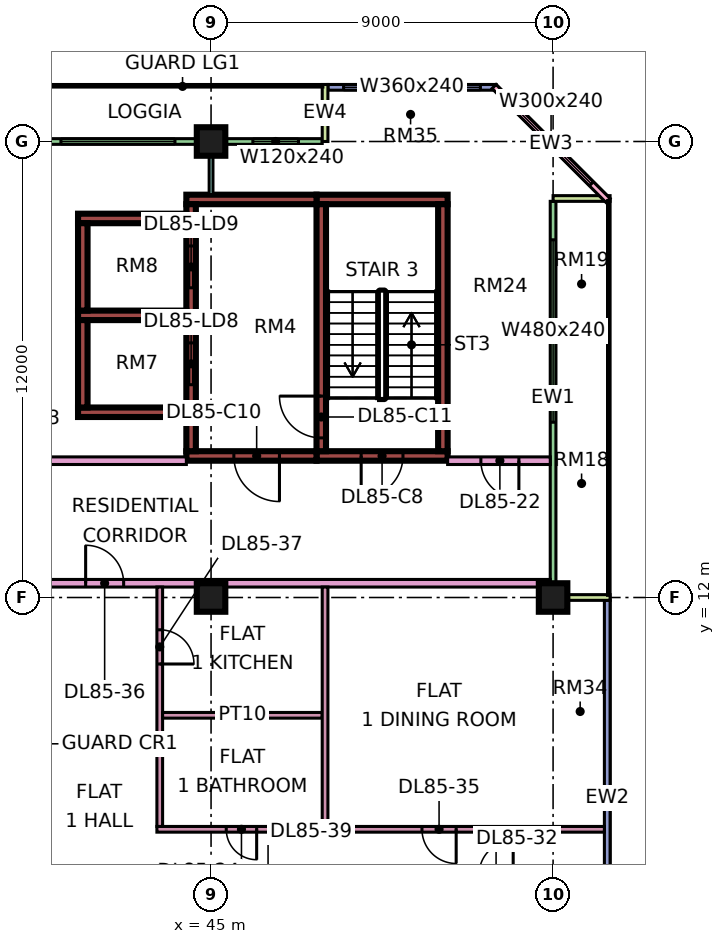
"""IFC4 building model, lengths in metres.
Left out: names, types, materials, properties, quantities, classifications, styles, units other than length and angle.
Written with IfcOpenShell. Run it as: python <this file> out.ifc"""

import sys

from ifc_helpers import new_model, si_unit, direction, frame, frame_2d, origin, origin_2d, place, context, subcontext, project, spatial, rectangle, extrude, element, fill, save


model = new_model("IFC4")
c1 = context("Model", 3, precision=1e-05, world=origin(), true_north=direction((0.0, 1.0)))
c2 = subcontext(c1, "Body", "Model", "MODEL_VIEW")
j1 = project(units=[si_unit("LENGTHUNIT", "METRE"), si_unit("PLANEANGLEUNIT", "RADIAN")], contexts=[c1])
p1 = place(None, origin())
s1 = spatial("IfcSite", under=j1, at=p1, CompositionType="ELEMENT")
p2 = place(p1, origin())
s2 = spatial("IfcBuilding", under=s1, at=p2, CompositionType="ELEMENT")
p3 = place(p2, frame((0.0, 0.0, 365.15)))
s3 = spatial("IfcBuildingStorey", under=s2, at=p3, CompositionType="ELEMENT", Elevation=365.15)
for number, where, z_axis, x_axis in (
    (1, (45.0, 12.0, 0.0), (0.0, 0.0, 1.0), (1.0, 0.0, 0.0)),
    (2, (45.0, 24.0, 0.0), (0.0, 0.0, 1.0), (1.0, 0.0, 0.0)),
    (3, (54.0, 12.0, 0.0), (0.0, 0.0, 1.0), (1.0, 0.0, 0.0)),
):
    element("IfcColumn", number, at=place(p3, frame(where, z_axis=z_axis, x_axis=x_axis)), inside=s3, PredefinedType="COLUMN", context=c2, shape_type="SweptSolid", body=[
        extrude(rectangle(XDim=0.75, YDim=0.75, at=origin_2d()), origin(), (0.0, 0.0, 1.0), 3.75),
    ])
p4 = place(p3, frame((47.775, 15.725, 0.0), z_axis=(0.0, 0.0, 1.0), x_axis=(1.0, 0.0, 0.0)))
e4 = element("IfcWall", 4, at=p4, inside=s3, PredefinedType="SHEAR", context=c2, shape_type="SweptSolid", body=[
    extrude(rectangle(XDim=3.45, YDim=0.25, at=frame_2d((1.725, 0.0))), origin(), (0.0, 0.0, 1.0), 3.75),
])
p5 = place(p4, frame((1.175, 0.0, 0.0)))
e5 = element("IfcOpeningElement", 5, at=p5, cuts=e4, PredefinedType="OPENING", context=c2, shape_type="SweptSolid", body=[
    extrude(rectangle(XDim=1.1, YDim=2.2, at=frame_2d((0.55, 1.1))), frame((0.0, 0.135, 0.0), z_axis=(0.0, -1.0, 0.0), x_axis=(1.0, 0.0, 0.0)), (0.0, 0.0, 1.0), 0.27),
])
p6 = place(p3, frame((47.775, 22.475, 0.0), z_axis=(0.0, 0.0, 1.0), x_axis=(1.0, 0.0, 0.0)))
e6 = element("IfcWall", 6, at=p6, inside=s3, PredefinedType="SHEAR", context=c2, shape_type="SweptSolid", body=[
    extrude(rectangle(XDim=3.45, YDim=0.25, at=frame_2d((1.725, 0.0))), origin(), (0.0, 0.0, 1.0), 3.75),
])
p7 = place(p3, frame((47.9, 15.85, 0.0), z_axis=(0.0, 0.0, 1.0), x_axis=(0.0, 1.0, 0.0)))
e7 = element("IfcWall", 7, at=p7, inside=s3, PredefinedType="SHEAR", context=c2, shape_type="SweptSolid", body=[
    extrude(rectangle(XDim=6.5, YDim=0.25, at=frame_2d((3.25, 0.0))), origin(), (0.0, 0.0, 1.0), 3.75),
])
p8 = place(p7, frame((0.35, 0.0, 0.0)))
e8 = element("IfcOpeningElement", 8, at=p8, cuts=e7, PredefinedType="OPENING", context=c2, shape_type="SweptSolid", body=[
    extrude(rectangle(XDim=1.1, YDim=2.2, at=frame_2d((0.55, 1.1))), frame((0.0, 0.135, 0.0), z_axis=(0.0, -1.0, 0.0), x_axis=(1.0, 0.0, 0.0)), (0.0, 0.0, 1.0), 0.27),
])
p9 = place(p3, frame((51.1, 15.85, 0.0), z_axis=(0.0, 0.0, 1.0), x_axis=(0.0, 1.0, 0.0)))
e9 = element("IfcWall", 9, at=p9, inside=s3, PredefinedType="SHEAR", context=c2, shape_type="SweptSolid", body=[
    extrude(rectangle(XDim=6.5, YDim=0.25, at=frame_2d((3.25, 0.0))), origin(), (0.0, 0.0, 1.0), 3.75),
])
p10 = place(p3, frame((44.35, 15.725, 0.0), z_axis=(0.0, 0.0, 1.0), x_axis=(1.0, 0.0, 0.0)))
e10 = element("IfcWall", 10, at=p10, inside=s3, PredefinedType="SHEAR", context=c2, shape_type="SweptSolid", body=[
    extrude(rectangle(XDim=3.425, YDim=0.25, at=frame_2d((1.712, 0.0))), origin(), (0.0, 0.0, 1.0), 3.75),
])
p11 = place(p10, frame((1.25, 0.0, 0.0)))
e11 = element("IfcOpeningElement", 11, at=p11, cuts=e10, PredefinedType="OPENING", context=c2, shape_type="SweptSolid", body=[
    extrude(rectangle(XDim=1.2, YDim=2.2, at=frame_2d((0.6, 1.1))), frame((0.0, 0.135, 0.0), z_axis=(0.0, -1.0, 0.0), x_axis=(1.0, 0.0, 0.0)), (0.0, 0.0, 1.0), 0.27),
])
p12 = place(p3, frame((44.35, 22.475, 0.0), z_axis=(0.0, 0.0, 1.0), x_axis=(1.0, 0.0, 0.0)))
e12 = element("IfcWall", 12, at=p12, inside=s3, PredefinedType="SHEAR", context=c2, shape_type="SweptSolid", body=[
    extrude(rectangle(XDim=3.425, YDim=0.25, at=frame_2d((1.712, 0.0))), origin(), (0.0, 0.0, 1.0), 3.75),
])
p13 = place(p3, frame((44.475, 15.85, 0.0), z_axis=(0.0, 0.0, 1.0), x_axis=(0.0, 1.0, 0.0)))
e13 = element("IfcWall", 13, at=p13, inside=s3, PredefinedType="SHEAR", context=c2, shape_type="SweptSolid", body=[
    extrude(rectangle(XDim=6.5, YDim=0.25, at=frame_2d((3.25, 0.0))), origin(), (0.0, 0.0, 1.0), 3.75),
])
p14 = place(p13, frame((1.75, 0.0, 0.0)))
e14 = element("IfcOpeningElement", 14, at=p14, cuts=e13, PredefinedType="OPENING", context=c2, shape_type="SweptSolid", body=[
    extrude(rectangle(XDim=1.1, YDim=2.2, at=frame_2d((0.55, 1.1))), frame((0.0, 0.135, 0.0), z_axis=(0.0, -1.0, 0.0), x_axis=(1.0, 0.0, 0.0)), (0.0, 0.0, 1.0), 0.27),
])
p15 = place(p13, frame((4.3, 0.0, 0.0)))
e15 = element("IfcOpeningElement", 15, at=p15, cuts=e13, PredefinedType="OPENING", context=c2, shape_type="SweptSolid", body=[
    extrude(rectangle(XDim=1.1, YDim=2.2, at=frame_2d((0.55, 1.1))), frame((0.0, 0.135, 0.0), z_axis=(0.0, -1.0, 0.0), x_axis=(1.0, 0.0, 0.0)), (0.0, 0.0, 1.0), 0.27),
])
for number, where, z_axis, x_axis in (
    (16, (41.5, 16.875, 0.0), (0.0, 0.0, 1.0), (1.0, 0.0, 0.0)),
    (17, (41.5, 19.425, 0.0), (0.0, 0.0, 1.0), (1.0, 0.0, 0.0)),
    (18, (41.5, 21.975, 0.0), (0.0, 0.0, 1.0), (1.0, 0.0, 0.0)),
):
    element("IfcWall", number, at=place(p3, frame(where, z_axis=z_axis, x_axis=x_axis)), inside=s3, PredefinedType="SHEAR", context=c2, shape_type="SweptSolid", body=[
        extrude(rectangle(XDim=2.85, YDim=0.25, at=frame_2d((1.425, 0.0))), origin(), (0.0, 0.0, 1.0), 3.75),
    ])
for number, where, z_axis, x_axis in (
    (19, (41.625, 17.0, 0.0), (0.0, 0.0, 1.0), (0.0, 1.0, 0.0)),
    (20, (41.625, 19.55, 0.0), (0.0, 0.0, 1.0), (0.0, 1.0, 0.0)),
):
    element("IfcWall", number, at=place(p3, frame(where, z_axis=z_axis, x_axis=x_axis)), inside=s3, PredefinedType="SHEAR", context=c2, shape_type="SweptSolid", body=[
        extrude(rectangle(XDim=2.3, YDim=0.25, at=frame_2d((1.15, 0.0))), origin(), (0.0, 0.0, 1.0), 3.75),
    ])
p16 = place(p3, frame((52.5, 25.425, 0.0), z_axis=(0.0, 0.0, 1.0), x_axis=(-1.0, 0.0, 0.0)))
e21 = element("IfcWall", 21, at=p16, inside=s3, PredefinedType="SOLIDWALL", context=c2, shape_type="SweptSolid", body=[
    extrude(rectangle(XDim=4.425, YDim=0.15, at=frame_2d((2.212, 0.0))), origin(), (0.0, 0.0, 1.0), 3.35),
])
p17 = place(p16, frame((0.413, 0.0, 0.45)))
e22 = element("IfcOpeningElement", 22, at=p17, cuts=e21, PredefinedType="OPENING", context=c2, shape_type="SweptSolid", body=[
    extrude(rectangle(XDim=3.6, YDim=2.4, at=frame_2d((1.8, 1.2))), frame((0.0, 0.085, 0.0), z_axis=(0.0, -1.0, 0.0), x_axis=(1.0, 0.0, 0.0)), (0.0, 0.0, 1.0), 0.17),
])
p18 = place(p3, frame((47.925, 24.0, 0.0), z_axis=(0.0, 0.0, 1.0), x_axis=(-1.0, 0.0, 0.0)))
e23 = element("IfcWall", 23, at=p18, inside=s3, PredefinedType="SOLIDWALL", context=c2, shape_type="SweptSolid", body=[
    extrude(rectangle(XDim=7.35, YDim=0.15, at=frame_2d((3.675, 0.0))), origin(), (0.0, 0.0, 1.0), 3.35),
])
p19 = place(p18, frame((0.625, 0.0, 0.45)))
e24 = element("IfcOpeningElement", 24, at=p19, cuts=e23, PredefinedType="OPENING", context=c2, shape_type="SweptSolid", body=[
    extrude(rectangle(XDim=1.2, YDim=2.4, at=frame_2d((0.6, 1.2))), frame((0.0, 0.085, 0.0), z_axis=(0.0, -1.0, 0.0), x_axis=(1.0, 0.0, 0.0)), (0.0, 0.0, 1.0), 0.17),
])
p20 = place(p18, frame((3.875, 0.0, 0.45)))
e25 = element("IfcOpeningElement", 25, at=p20, cuts=e23, PredefinedType="OPENING", context=c2, shape_type="SweptSolid", body=[
    extrude(rectangle(XDim=3.0, YDim=2.4, at=frame_2d((1.5, 1.2))), frame((0.0, 0.085, 0.0), z_axis=(0.0, -1.0, 0.0), x_axis=(1.0, 0.0, 0.0)), (0.0, 0.0, 1.0), 0.17),
])
p21 = place(p3, frame((48.0, 25.5, 0.0), z_axis=(0.0, 0.0, 1.0), x_axis=(0.0, -1.0, 0.0)))
e26 = element("IfcWall", 26, at=p21, inside=s3, PredefinedType="SOLIDWALL", context=c2, shape_type="SweptSolid", body=[
    extrude(rectangle(XDim=1.5, YDim=0.15, at=frame_2d((0.75, 0.0))), origin(), (0.0, 0.0, 1.0), 3.35),
])
p22 = place(p3, frame((55.425, 1.5, 0.0), z_axis=(0.0, 0.0, 1.0), x_axis=(0.0, 1.0, 0.0)))
e27 = element("IfcWall", 27, at=p22, inside=s3, PredefinedType="SOLIDWALL", context=c2, shape_type="SweptSolid", body=[
    extrude(rectangle(XDim=10.425, YDim=0.15, at=frame_2d((5.212, 0.0))), origin(), (0.0, 0.0, 1.0), 3.35),
])
p23 = place(p22, frame((0.4, 0.0, 0.45)))
e28 = element("IfcOpeningElement", 28, at=p23, cuts=e27, PredefinedType="OPENING", context=c2, shape_type="SweptSolid", body=[
    extrude(rectangle(XDim=2.4, YDim=2.4, at=frame_2d((1.2, 1.2))), frame((0.0, 0.085, 0.0), z_axis=(0.0, -1.0, 0.0), x_axis=(1.0, 0.0, 0.0)), (0.0, 0.0, 1.0), 0.17),
])
p24 = place(p3, frame((54.0, 12.075, 0.0), z_axis=(0.0, 0.0, 1.0), x_axis=(0.0, 1.0, 0.0)))
e29 = element("IfcWall", 29, at=p24, inside=s3, PredefinedType="SOLIDWALL", context=c2, shape_type="SweptSolid", body=[
    extrude(rectangle(XDim=10.35, YDim=0.15, at=frame_2d((5.175, 0.0))), origin(), (0.0, 0.0, 1.0), 3.35),
])
p25 = place(p24, frame((4.538, 0.0, 0.45)))
e30 = element("IfcOpeningElement", 30, at=p25, cuts=e29, PredefinedType="OPENING", context=c2, shape_type="SweptSolid", body=[
    extrude(rectangle(XDim=4.8, YDim=2.4, at=frame_2d((2.4, 1.2))), frame((0.0, 0.085, 0.0), z_axis=(0.0, -1.0, 0.0), x_axis=(1.0, 0.0, 0.0)), (0.0, 0.0, 1.0), 0.17),
])
for number, where, z_axis, x_axis in (
    (31, (55.5, 12.0, 0.0), (0.0, 0.0, 1.0), (-1.0, 0.0, 0.0)),
    (32, (55.5, 22.5, 0.0), (0.0, 0.0, 1.0), (-1.0, 0.0, 0.0)),
):
    element("IfcWall", number, at=place(p3, frame(where, z_axis=z_axis, x_axis=x_axis)), inside=s3, PredefinedType="SOLIDWALL", context=c2, shape_type="SweptSolid", body=[
        extrude(rectangle(XDim=1.5, YDim=0.15, at=frame_2d((0.75, 0.0))), origin(), (0.0, 0.0, 1.0), 3.35),
    ])
p26 = place(p3, frame((55.447, 22.447, 0.0), z_axis=(0.0, 0.0, 1.0), x_axis=(-0.707106781187, 0.707106781187, 0.0)))
e33 = element("IfcWall", 33, at=p26, inside=s3, PredefinedType="SOLIDWALL", context=c2, shape_type="SweptSolid", body=[
    extrude(rectangle(XDim=4.243, YDim=0.15, at=frame_2d((2.121, 0.0))), origin(), (0.0, 0.0, 1.0), 3.35),
])
p27 = place(p26, frame((0.621, 0.0, 0.45)))
e34 = element("IfcOpeningElement", 34, at=p27, cuts=e33, PredefinedType="OPENING", context=c2, shape_type="SweptSolid", body=[
    extrude(rectangle(XDim=3.0, YDim=2.4, at=frame_2d((1.5, 1.2))), frame((0.0, 0.085, 0.0), z_axis=(0.0, -1.0, 0.0), x_axis=(1.0, 0.0, 0.0)), (0.0, 0.0, 1.0), 0.17),
])
p28 = place(p3, frame((34.0, 15.6, 0.0), z_axis=(0.0, 0.0, 1.0), x_axis=(1.0, 0.0, 0.0)))
e35 = element("IfcWall", 35, at=p28, inside=s3, PredefinedType="PARTITIONING", context=c2, shape_type="SweptSolid", body=[
    extrude(rectangle(XDim=10.35, YDim=0.2, at=frame_2d((5.175, 0.0))), origin(), (0.0, 0.0, 1.0), 3.35),
])
p29 = place(p28, frame((5.6, 0.0, 0.0)))
e36 = element("IfcOpeningElement", 36, at=p29, cuts=e35, PredefinedType="OPENING", context=c2, shape_type="SweptSolid", body=[
    extrude(rectangle(XDim=1.0, YDim=2.1, at=frame_2d((0.5, 1.05))), frame((0.0, 0.11, 0.0), z_axis=(0.0, -1.0, 0.0), x_axis=(1.0, 0.0, 0.0)), (0.0, 0.0, 1.0), 0.22),
])
p30 = place(p28, frame((0.45, 0.0, 0.0)))
e37 = element("IfcOpeningElement", 37, at=p30, cuts=e35, PredefinedType="OPENING", context=c2, shape_type="SweptSolid", body=[
    extrude(rectangle(XDim=1.2, YDim=2.1, at=frame_2d((0.6, 1.05))), frame((0.0, 0.11, 0.0), z_axis=(0.0, -1.0, 0.0), x_axis=(1.0, 0.0, 0.0)), (0.0, 0.0, 1.0), 0.22),
])
p31 = place(p3, frame((40.65, 12.375, 0.0), z_axis=(0.0, 0.0, 1.0), x_axis=(1.0, 0.0, 0.0)))
e38 = element("IfcWall", 38, at=p31, inside=s3, PredefinedType="PARTITIONING", context=c2, shape_type="SweptSolid", body=[
    extrude(rectangle(XDim=13.276, YDim=0.2, at=frame_2d((6.638, 0.0))), origin(), (0.0, 0.0, 1.0), 3.35),
])
p32 = place(p31, frame((1.05, 0.0, 0.0)))
e39 = element("IfcOpeningElement", 39, at=p32, cuts=e38, PredefinedType="OPENING", context=c2, shape_type="SweptSolid", body=[
    extrude(rectangle(XDim=1.0, YDim=2.1, at=frame_2d((0.5, 1.05))), frame((0.0, 0.11, 0.0), z_axis=(0.0, -1.0, 0.0), x_axis=(1.0, 0.0, 0.0)), (0.0, 0.0, 1.0), 0.22),
])
p33 = place(p3, frame((43.575, 5.9, 0.0), z_axis=(0.0, 0.0, 1.0), x_axis=(1.0, 0.0, 0.0)))
e40 = element("IfcWall", 40, at=p33, inside=s3, PredefinedType="PARTITIONING", context=c2, shape_type="SweptSolid", body=[
    extrude(rectangle(XDim=11.775, YDim=0.15, at=frame_2d((5.888, 0.0))), origin(), (0.0, 0.0, 1.0), 3.35),
])
p34 = place(p33, frame((1.825, 0.0, 0.0)))
e41 = element("IfcOpeningElement", 41, at=p34, cuts=e40, PredefinedType="OPENING", context=c2, shape_type="SweptSolid", body=[
    extrude(rectangle(XDim=0.8, YDim=2.1, at=frame_2d((0.4, 1.05))), frame((0.0, 0.085, 0.0), z_axis=(0.0, -1.0, 0.0), x_axis=(1.0, 0.0, 0.0)), (0.0, 0.0, 1.0), 0.17),
])
p35 = place(p33, frame((6.975, 0.0, 0.0)))
e42 = element("IfcOpeningElement", 42, at=p35, cuts=e40, PredefinedType="OPENING", context=c2, shape_type="SweptSolid", body=[
    extrude(rectangle(XDim=0.9, YDim=2.1, at=frame_2d((0.45, 1.05))), frame((0.0, 0.085, 0.0), z_axis=(0.0, -1.0, 0.0), x_axis=(1.0, 0.0, 0.0)), (0.0, 0.0, 1.0), 0.17),
])
p36 = place(p3, frame((43.65, 5.975, 0.0), z_axis=(0.0, 0.0, 1.0), x_axis=(0.0, 1.0, 0.0)))
e43 = element("IfcWall", 43, at=p36, inside=s3, PredefinedType="PARTITIONING", context=c2, shape_type="SweptSolid", body=[
    extrude(rectangle(XDim=6.3, YDim=0.15, at=frame_2d((3.15, 0.0))), origin(), (0.0, 0.0, 1.0), 3.35),
])
p37 = place(p36, frame((4.275, 0.0, 0.0)))
e44 = element("IfcOpeningElement", 44, at=p37, cuts=e43, PredefinedType="OPENING", context=c2, shape_type="SweptSolid", body=[
    extrude(rectangle(XDim=0.9, YDim=2.1, at=frame_2d((0.45, 1.05))), frame((0.0, 0.085, 0.0), z_axis=(0.0, -1.0, 0.0), x_axis=(1.0, 0.0, 0.0)), (0.0, 0.0, 1.0), 0.17),
])
p38 = place(p3, frame((43.725, 8.9, 0.0), z_axis=(0.0, 0.0, 1.0), x_axis=(1.0, 0.0, 0.0)))
e45 = element("IfcWall", 45, at=p38, inside=s3, PredefinedType="PARTITIONING", context=c2, shape_type="SweptSolid", body=[
    extrude(rectangle(XDim=4.2, YDim=0.15, at=frame_2d((2.1, 0.0))), origin(), (0.0, 0.0, 1.0), 3.35),
])
p39 = place(p3, frame((45.0, 22.6, 0.0), z_axis=(0.0, 0.0, 1.0), x_axis=(0.0, 1.0, 0.0)))
e46 = element("IfcWall", 46, at=p39, inside=s3, PredefinedType="PARTITIONING", context=c2, shape_type="SweptSolid", body=[
    extrude(rectangle(XDim=1.326, YDim=0.1, at=frame_2d((0.663, 0.0))), origin(), (0.0, 0.0, 1.0), 3.35),
])
p40 = place(p3, frame((48.0, 5.975, 0.0), z_axis=(0.0, 0.0, 1.0), x_axis=(0.0, 1.0, 0.0)))
e47 = element("IfcWall", 47, at=p40, inside=s3, PredefinedType="PARTITIONING", context=c2, shape_type="SweptSolid", body=[
    extrude(rectangle(XDim=6.3, YDim=0.15, at=frame_2d((3.15, 0.0))), origin(), (0.0, 0.0, 1.0), 3.35),
])
p41 = place(p3, frame((51.225, 15.6, 0.0), z_axis=(0.0, 0.0, 1.0), x_axis=(1.0, 0.0, 0.0)))
e48 = element("IfcWall", 48, at=p41, inside=s3, PredefinedType="PARTITIONING", context=c2, shape_type="SweptSolid", body=[
    extrude(rectangle(XDim=2.701, YDim=0.2, at=frame_2d((1.351, 0.0))), origin(), (0.0, 0.0, 1.0), 3.35),
])
p42 = place(p41, frame((0.875, 0.0, 0.0)))
e49 = element("IfcOpeningElement", 49, at=p42, cuts=e48, PredefinedType="OPENING", context=c2, shape_type="SweptSolid", body=[
    extrude(rectangle(XDim=1.0, YDim=2.1, at=frame_2d((0.5, 1.05))), frame((0.0, 0.11, 0.0), z_axis=(0.0, -1.0, 0.0), x_axis=(1.0, 0.0, 0.0)), (0.0, 0.0, 1.0), 0.22),
])
p43 = place(p17, origin())
e50 = element("IfcWindow", 50, at=p43, inside=s3, PartitioningType="SINGLE_PANEL", PredefinedType="WINDOW", context=c2, shape_type="SweptSolid", body=[
    extrude(rectangle(XDim=3.6, YDim=2.4, at=frame_2d((1.8, 1.2))), frame((0.0, 0.03, 0.0), z_axis=(0.0, -1.0, 0.0), x_axis=(1.0, 0.0, 0.0)), (0.0, 0.0, 1.0), 0.06),
])
fill(e22, e50)
p44 = place(p19, origin())
e51 = element("IfcWindow", 51, at=p44, inside=s3, PartitioningType="SINGLE_PANEL", PredefinedType="WINDOW", context=c2, shape_type="SweptSolid", body=[
    extrude(rectangle(XDim=1.2, YDim=2.4, at=frame_2d((0.6, 1.2))), frame((0.0, 0.03, 0.0), z_axis=(0.0, -1.0, 0.0), x_axis=(1.0, 0.0, 0.0)), (0.0, 0.0, 1.0), 0.06),
])
fill(e24, e51)
p45 = place(p20, origin())
e52 = element("IfcWindow", 52, at=p45, inside=s3, PartitioningType="SINGLE_PANEL", PredefinedType="WINDOW", context=c2, shape_type="SweptSolid", body=[
    extrude(rectangle(XDim=3.0, YDim=2.4, at=frame_2d((1.5, 1.2))), frame((0.0, 0.03, 0.0), z_axis=(0.0, -1.0, 0.0), x_axis=(1.0, 0.0, 0.0)), (0.0, 0.0, 1.0), 0.06),
])
fill(e25, e52)
p46 = place(p25, origin())
e53 = element("IfcWindow", 53, at=p46, inside=s3, PartitioningType="SINGLE_PANEL", PredefinedType="WINDOW", context=c2, shape_type="SweptSolid", body=[
    extrude(rectangle(XDim=4.8, YDim=2.4, at=frame_2d((2.4, 1.2))), frame((0.0, 0.03, 0.0), z_axis=(0.0, -1.0, 0.0), x_axis=(1.0, 0.0, 0.0)), (0.0, 0.0, 1.0), 0.06),
])
fill(e30, e53)
p47 = place(p27, origin())
e54 = element("IfcWindow", 54, at=p47, inside=s3, PartitioningType="SINGLE_PANEL", PredefinedType="WINDOW", context=c2, shape_type="SweptSolid", body=[
    extrude(rectangle(XDim=3.0, YDim=2.4, at=frame_2d((1.5, 1.2))), frame((0.0, 0.03, 0.0), z_axis=(0.0, -1.0, 0.0), x_axis=(1.0, 0.0, 0.0)), (0.0, 0.0, 1.0), 0.06),
])
fill(e34, e54)
p48 = place(p5, frame((1.1, 0.0, 0.0), z_axis=(0.0, 0.0, 1.0), x_axis=(-1.0, 0.0, 0.0)))
e55 = element("IfcDoor", 55, at=p48, inside=s3, OperationType="SINGLE_SWING_LEFT", PredefinedType="DOOR", context=c2, shape_type="SweptSolid", body=[
    extrude(rectangle(XDim=1.1, YDim=2.2, at=frame_2d((0.55, 1.1))), frame((0.0, 0.025, 0.0), z_axis=(0.0, -1.0, 0.0), x_axis=(1.0, 0.0, 0.0)), (0.0, 0.0, 1.0), 0.05),
])
fill(e5, e55)
p49 = place(p11, origin())
e56 = element("IfcDoor", 56, at=p49, inside=s3, OperationType="SINGLE_SWING_RIGHT", PredefinedType="DOOR", context=c2, shape_type="SweptSolid", body=[
    extrude(rectangle(XDim=1.2, YDim=2.2, at=frame_2d((0.6, 1.1))), frame((0.0, 0.025, 0.0), z_axis=(0.0, -1.0, 0.0), x_axis=(1.0, 0.0, 0.0)), (0.0, 0.0, 1.0), 0.05),
])
fill(e11, e56)
p50 = place(p8, frame((1.1, 0.0, 0.0), z_axis=(0.0, 0.0, 1.0), x_axis=(-1.0, 0.0, 0.0)))
e57 = element("IfcDoor", 57, at=p50, inside=s3, OperationType="SINGLE_SWING_RIGHT", PredefinedType="DOOR", context=c2, shape_type="SweptSolid", body=[
    extrude(rectangle(XDim=1.1, YDim=2.2, at=frame_2d((0.55, 1.1))), frame((0.0, 0.025, 0.0), z_axis=(0.0, -1.0, 0.0), x_axis=(1.0, 0.0, 0.0)), (0.0, 0.0, 1.0), 0.05),
])
fill(e8, e57)
p51 = place(p14, origin())
e58 = element("IfcDoor", 58, at=p51, inside=s3, OperationType="DOUBLE_DOOR_SLIDING", PredefinedType="DOOR", context=c2, shape_type="SweptSolid", body=[
    extrude(rectangle(XDim=1.1, YDim=2.2, at=frame_2d((0.55, 1.1))), frame((0.0, 0.025, 0.0), z_axis=(0.0, -1.0, 0.0), x_axis=(1.0, 0.0, 0.0)), (0.0, 0.0, 1.0), 0.05),
])
fill(e14, e58)
p52 = place(p15, origin())
e59 = element("IfcDoor", 59, at=p52, inside=s3, OperationType="DOUBLE_DOOR_SLIDING", PredefinedType="DOOR", context=c2, shape_type="SweptSolid", body=[
    extrude(rectangle(XDim=1.1, YDim=2.2, at=frame_2d((0.55, 1.1))), frame((0.0, 0.025, 0.0), z_axis=(0.0, -1.0, 0.0), x_axis=(1.0, 0.0, 0.0)), (0.0, 0.0, 1.0), 0.05),
])
fill(e15, e59)
p53 = place(p42, origin())
e60 = element("IfcDoor", 60, at=p53, inside=s3, OperationType="SINGLE_SWING_RIGHT", PredefinedType="DOOR", context=c2, shape_type="SweptSolid", body=[
    extrude(rectangle(XDim=1.0, YDim=2.1, at=frame_2d((0.5, 1.05))), frame((0.0, 0.025, 0.0), z_axis=(0.0, -1.0, 0.0), x_axis=(1.0, 0.0, 0.0)), (0.0, 0.0, 1.0), 0.05),
])
fill(e49, e60)
p54 = place(p34, origin())
e61 = element("IfcDoor", 61, at=p54, inside=s3, OperationType="SINGLE_SWING_RIGHT", PredefinedType="DOOR", context=c2, shape_type="SweptSolid", body=[
    extrude(rectangle(XDim=0.8, YDim=2.1, at=frame_2d((0.4, 1.05))), frame((0.0, 0.025, 0.0), z_axis=(0.0, -1.0, 0.0), x_axis=(1.0, 0.0, 0.0)), (0.0, 0.0, 1.0), 0.05),
])
fill(e41, e61)
p55 = place(p35, origin())
e62 = element("IfcDoor", 62, at=p55, inside=s3, OperationType="SINGLE_SWING_RIGHT", PredefinedType="DOOR", context=c2, shape_type="SweptSolid", body=[
    extrude(rectangle(XDim=0.9, YDim=2.1, at=frame_2d((0.45, 1.05))), frame((0.0, 0.025, 0.0), z_axis=(0.0, -1.0, 0.0), x_axis=(1.0, 0.0, 0.0)), (0.0, 0.0, 1.0), 0.05),
])
fill(e42, e62)
p56 = place(p32, origin())
e63 = element("IfcDoor", 63, at=p56, inside=s3, OperationType="SINGLE_SWING_LEFT", PredefinedType="DOOR", context=c2, shape_type="SweptSolid", body=[
    extrude(rectangle(XDim=1.0, YDim=2.1, at=frame_2d((0.5, 1.05))), frame((0.0, 0.025, 0.0), z_axis=(0.0, -1.0, 0.0), x_axis=(1.0, 0.0, 0.0)), (0.0, 0.0, 1.0), 0.05),
])
fill(e39, e63)
p57 = place(p37, frame((0.9, 0.0, 0.0), z_axis=(0.0, 0.0, 1.0), x_axis=(-1.0, 0.0, 0.0)))
e64 = element("IfcDoor", 64, at=p57, inside=s3, OperationType="SINGLE_SWING_LEFT", PredefinedType="DOOR", context=c2, shape_type="SweptSolid", body=[
    extrude(rectangle(XDim=0.9, YDim=2.1, at=frame_2d((0.45, 1.05))), frame((0.0, 0.025, 0.0), z_axis=(0.0, -1.0, 0.0), x_axis=(1.0, 0.0, 0.0)), (0.0, 0.0, 1.0), 0.05),
])
fill(e44, e64)
save(model, sys.argv[1])
